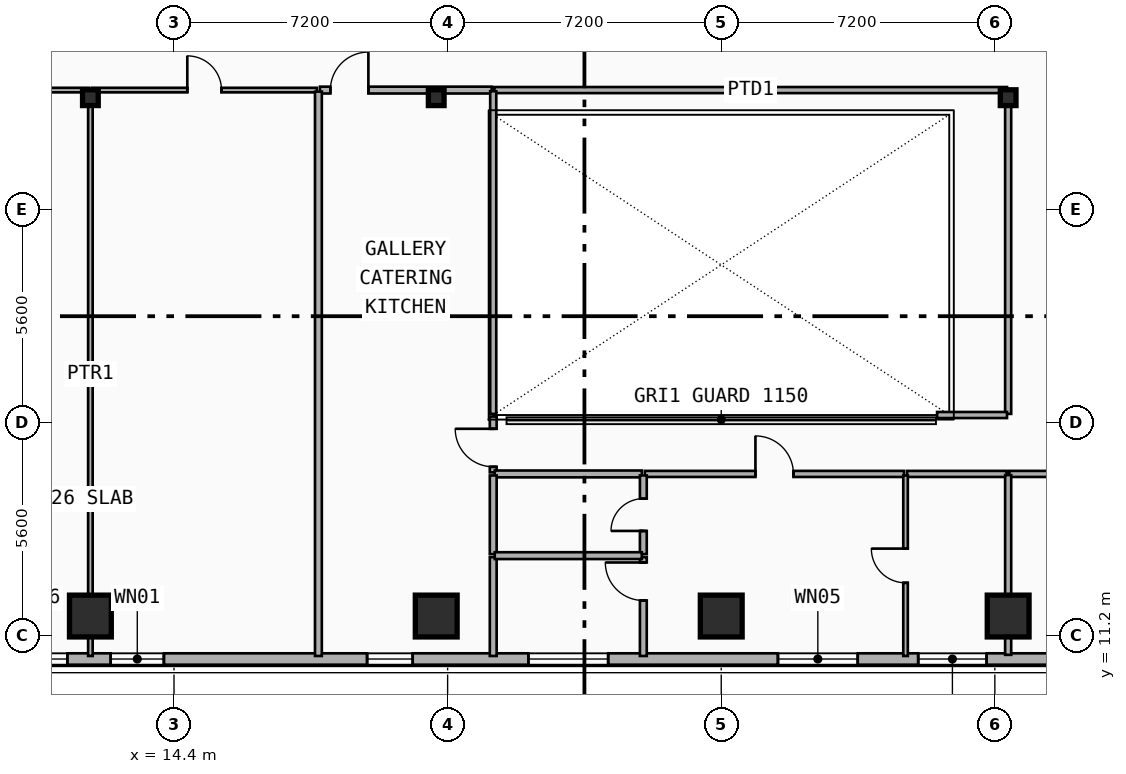
"""IFC4 building model, lengths in metres.
Left out: names, types, materials, properties, quantities, classifications, styles, units other than length and angle.
Written with IfcOpenShell. Run it as: python <this file> out.ifc"""

import sys

from ifc_helpers import new_model, si_unit, direction, frame, frame_2d, origin, origin_2d, place, context, subcontext, project, spatial, rectangle, i_section, extrude, element, fill, save


model = new_model("IFC4")
c1 = context("Model", 3, precision=1e-05, world=origin(), true_north=direction((0.0, 1.0)))
c2 = subcontext(c1, "Body", "Model", "MODEL_VIEW")
j1 = project(units=[si_unit("LENGTHUNIT", "METRE"), si_unit("PLANEANGLEUNIT", "RADIAN")], contexts=[c1])
p1 = place(None, origin())
s1 = spatial("IfcSite", under=j1, at=p1, CompositionType="ELEMENT")
p2 = place(p1, origin())
s2 = spatial("IfcBuilding", under=s1, at=p2, CompositionType="ELEMENT")
p3 = place(p2, frame((0.0, 0.0, 159.0)))
s3 = spatial("IfcBuildingStorey", under=s2, at=p3, CompositionType="ELEMENT", Elevation=159.0)
for number, where, z_axis, x_axis in (
    (1, (12.2, 25.35, 0.0), (0.0, 0.0, 1.0), (1.0, 0.0, 0.0)),
    (2, (21.3, 25.35, 0.0), (0.0, 0.0, 1.0), (1.0, 0.0, 0.0)),
    (3, (36.35, 25.35, 0.0), (0.0, 0.0, 1.0), (1.0, 0.0, 0.0)),
):
    element("IfcColumn", number, at=place(p3, frame(where, z_axis=z_axis, x_axis=x_axis)), inside=s3, PredefinedType="COLUMN", context=c2, shape_type="SweptSolid", body=[
        extrude(i_section(OverallWidth=0.413, OverallDepth=0.415, WebThickness=0.03, FlangeThickness=0.047, FilletRadius=0.015, at=origin_2d()), origin(), (0.0, 0.0, 1.0), 3.55),
    ])
for number, where, z_axis, x_axis in (
    (4, (12.2, 11.819, 0.0), (0.0, -0.09, 0.996), (1.0, 0.0, 0.0)),
    (5, (21.3, 11.819, 0.0), (0.0, -0.09, 0.996), (1.0, 0.0, 0.0)),
    (6, (28.8, 11.819, 0.0), (0.0, -0.09, 0.996), (1.0, 0.0, 0.0)),
    (7, (36.35, 11.819, 0.0), (0.0, -0.09, 0.996), (1.0, 0.0, 0.0)),
):
    element("IfcColumn", number, at=place(p3, frame(where, z_axis=z_axis, x_axis=x_axis)), inside=s3, PredefinedType="COLUMN", context=c2, shape_type="SweptSolid", body=[
        extrude(rectangle(XDim=1.1, YDim=1.1, at=origin_2d()), origin(), (0.0, 0.0, 1.0), 3.565),
    ])
p4 = place(p3, frame((48.0, 10.58, 0.0), z_axis=(0.0, 0.0, 1.0), x_axis=(-1.0, 0.0, 0.0)))
e8 = element("IfcWall", 8, at=p4, inside=s3, PredefinedType="SOLIDWALL", context=c2, shape_type="SweptSolid", body=[
    extrude(rectangle(XDim=38.4, YDim=0.3, at=frame_2d((19.2, 0.0))), origin(), (0.0, 0.0, 1.0), 3.29),
])
p5 = place(p4, frame((36.407, 0.0, 0.75)))
e9 = element("IfcOpeningElement", 9, at=p5, cuts=e8, PredefinedType="OPENING", context=c2, shape_type="SweptSolid", body=[
    extrude(rectangle(XDim=1.6, YDim=1.95, at=frame_2d((0.8, 0.975))), frame((0.0, 0.16, 0.0), z_axis=(0.0, -1.0, 0.0), x_axis=(1.0, 0.0, 0.0)), (0.0, 0.0, 1.0), 0.32),
])
p6 = place(p4, frame((33.866, 0.0, 0.34)))
e10 = element("IfcOpeningElement", 10, at=p6, cuts=e8, PredefinedType="OPENING", context=c2, shape_type="SweptSolid", body=[
    extrude(rectangle(XDim=1.4, YDim=1.8, at=frame_2d((0.7, 0.9))), frame((0.0, 0.16, 0.0), z_axis=(0.0, -1.0, 0.0), x_axis=(1.0, 0.0, 0.0)), (0.0, 0.0, 1.0), 0.32),
])
p7 = place(p4, frame((27.319, 0.0, 1.05)))
e11 = element("IfcOpeningElement", 11, at=p7, cuts=e8, PredefinedType="OPENING", context=c2, shape_type="SweptSolid", body=[
    extrude(rectangle(XDim=1.2, YDim=1.5, at=frame_2d((0.6, 0.75))), frame((0.0, 0.16, 0.0), z_axis=(0.0, -1.0, 0.0), x_axis=(1.0, 0.0, 0.0)), (0.0, 0.0, 1.0), 0.32),
])
p8 = place(p4, frame((15.608, 0.0, 0.65)))
e12 = element("IfcOpeningElement", 12, at=p8, cuts=e8, PredefinedType="OPENING", context=c2, shape_type="SweptSolid", body=[
    extrude(rectangle(XDim=2.1, YDim=2.1, at=frame_2d((1.05, 1.05))), frame((0.0, 0.16, 0.0), z_axis=(0.0, -1.0, 0.0), x_axis=(1.0, 0.0, 0.0)), (0.0, 0.0, 1.0), 0.32),
])
p9 = place(p4, frame((22.175, 0.0, 0.65)))
e13 = element("IfcOpeningElement", 13, at=p9, cuts=e8, PredefinedType="OPENING", context=c2, shape_type="SweptSolid", body=[
    extrude(rectangle(XDim=2.1, YDim=2.1, at=frame_2d((1.05, 1.05))), frame((0.0, 0.16, 0.0), z_axis=(0.0, -1.0, 0.0), x_axis=(1.0, 0.0, 0.0)), (0.0, 0.0, 1.0), 0.32),
])
p10 = place(p4, frame((12.217, 0.0, 0.34)))
e14 = element("IfcOpeningElement", 14, at=p10, cuts=e8, PredefinedType="OPENING", context=c2, shape_type="SweptSolid", body=[
    extrude(rectangle(XDim=1.8, YDim=1.8, at=frame_2d((0.9, 0.9))), frame((0.0, 0.16, 0.0), z_axis=(0.0, -1.0, 0.0), x_axis=(1.0, 0.0, 0.0)), (0.0, 0.0, 1.0), 0.32),
])
p11 = place(p4, frame((3.319, 0.0, 1.05)))
e15 = element("IfcOpeningElement", 15, at=p11, cuts=e8, PredefinedType="OPENING", context=c2, shape_type="SweptSolid", body=[
    extrude(rectangle(XDim=1.2, YDim=1.5, at=frame_2d((0.6, 0.75))), frame((0.0, 0.16, 0.0), z_axis=(0.0, -1.0, 0.0), x_axis=(1.0, 0.0, 0.0)), (0.0, 0.0, 1.0), 0.32),
])
p12 = place(p4, frame((8.25, 0.0, 0.52)))
e16 = element("IfcOpeningElement", 16, at=p12, cuts=e8, PredefinedType="OPENING", context=c2, shape_type="SweptSolid", body=[
    extrude(rectangle(XDim=1.1, YDim=1.05, at=frame_2d((0.55, 0.525))), frame((0.0, 0.16, 0.0), z_axis=(0.0, -1.0, 0.0), x_axis=(1.0, 0.0, 0.0)), (0.0, 0.0, 1.0), 0.32),
])
p13 = place(p4, frame((0.4, 0.0, 0.68)))
e17 = element("IfcOpeningElement", 17, at=p13, cuts=e8, PredefinedType="OPENING", context=c2, shape_type="SweptSolid", body=[
    extrude(rectangle(XDim=1.2, YDim=1.5, at=frame_2d((0.6, 0.75))), frame((0.0, 0.16, 0.0), z_axis=(0.0, -1.0, 0.0), x_axis=(1.0, 0.0, 0.0)), (0.0, 0.0, 1.0), 0.32),
])
p14 = place(p3, frame((5.66, 25.55, 0.0), z_axis=(0.0, 0.0, 1.0), x_axis=(1.0, 0.0, 0.0)))
e18 = element("IfcWall", 18, at=p14, inside=s3, PredefinedType="PARTITIONING", context=c2, shape_type="SweptSolid", body=[
    extrude(rectangle(XDim=6.5, YDim=0.12, at=frame_2d((3.25, 0.0))), origin(), (0.0, 0.0, 1.0), 2.36),
])
p15 = place(p14, frame((2.8, 0.0, 0.0)))
e19 = element("IfcOpeningElement", 19, at=p15, cuts=e18, PredefinedType="OPENING", context=c2, shape_type="SweptSolid", body=[
    extrude(rectangle(XDim=0.9, YDim=2.1, at=frame_2d((0.45, 1.05))), frame((0.0, 0.07, 0.0), z_axis=(0.0, -1.0, 0.0), x_axis=(1.0, 0.0, 0.0)), (0.0, 0.0, 1.0), 0.14),
])
p16 = place(p3, frame((12.24, 25.55, 0.0), z_axis=(0.0, 0.0, 1.0), x_axis=(1.0, 0.0, 0.0)))
e20 = element("IfcWall", 20, at=p16, inside=s3, PredefinedType="PARTITIONING", context=c2, shape_type="SweptSolid", body=[
    extrude(rectangle(XDim=5.92, YDim=0.12, at=frame_2d((2.96, 0.0))), origin(), (0.0, 0.0, 1.0), 2.36),
])
p17 = place(p16, frame((2.51, 0.0, 0.0)))
e21 = element("IfcOpeningElement", 21, at=p17, cuts=e20, PredefinedType="OPENING", context=c2, shape_type="SweptSolid", body=[
    extrude(rectangle(XDim=0.9, YDim=2.1, at=frame_2d((0.45, 1.05))), frame((0.0, 0.07, 0.0), z_axis=(0.0, -1.0, 0.0), x_axis=(1.0, 0.0, 0.0)), (0.0, 0.0, 1.0), 0.14),
])
p18 = place(p3, frame((18.24, 25.55, 0.0), z_axis=(0.0, 0.0, 1.0), x_axis=(1.0, 0.0, 0.0)))
e22 = element("IfcWall", 22, at=p18, inside=s3, PredefinedType="PLUMBINGWALL", context=c2, shape_type="SweptSolid", body=[
    extrude(rectangle(XDim=4.52, YDim=0.18, at=frame_2d((2.26, 0.0))), origin(), (0.0, 0.0, 1.0), 2.36),
])
p19 = place(p18, frame((0.275, 0.0, 0.0)))
e23 = element("IfcOpeningElement", 23, at=p19, cuts=e22, PredefinedType="OPENING", context=c2, shape_type="SweptSolid", body=[
    extrude(rectangle(XDim=1.0, YDim=2.15, at=frame_2d((0.5, 1.075))), frame((0.0, 0.1, 0.0), z_axis=(0.0, -1.0, 0.0), x_axis=(1.0, 0.0, 0.0)), (0.0, 0.0, 1.0), 0.2),
])
p20 = place(p3, frame((22.8, 15.49, 0.0), z_axis=(0.0, 0.0, 1.0), x_axis=(0.0, 1.0, 0.0)))
e24 = element("IfcWall", 24, at=p20, inside=s3, PredefinedType="PLUMBINGWALL", context=c2, shape_type="SweptSolid", body=[
    extrude(rectangle(XDim=1.47, YDim=0.18, at=frame_2d((0.735, 0.0))), origin(), (0.0, 0.0, 1.0), 2.73),
])
p21 = place(p20, frame((0.148, 0.0, 0.0)))
e25 = element("IfcOpeningElement", 25, at=p21, cuts=e24, PredefinedType="OPENING", context=c2, shape_type="SweptSolid", body=[
    extrude(rectangle(XDim=1.0, YDim=2.15, at=frame_2d((0.5, 1.075))), frame((0.0, 0.1, 0.0), z_axis=(0.0, -1.0, 0.0), x_axis=(1.0, 0.0, 0.0)), (0.0, 0.0, 1.0), 0.2),
])
p22 = place(p3, frame((26.79, 15.45, 0.0), z_axis=(0.0, 0.0, 1.0), x_axis=(1.0, 0.0, 0.0)))
e26 = element("IfcWall", 26, at=p22, inside=s3, PredefinedType="PARTITIONING", context=c2, shape_type="SweptSolid", body=[
    extrude(rectangle(XDim=6.82, YDim=0.16, at=frame_2d((3.41, 0.0))), origin(), (0.0, 0.0, 1.0), 2.36),
])
p23 = place(p22, frame((2.91, 0.0, 0.0)))
e27 = element("IfcOpeningElement", 27, at=p23, cuts=e26, PredefinedType="OPENING", context=c2, shape_type="SweptSolid", body=[
    extrude(rectangle(XDim=1.0, YDim=2.15, at=frame_2d((0.5, 1.075))), frame((0.0, 0.09, 0.0), z_axis=(0.0, -1.0, 0.0), x_axis=(1.0, 0.0, 0.0)), (0.0, 0.0, 1.0), 0.18),
])
p24 = place(p3, frame((22.84, 15.45, 0.0), z_axis=(0.0, 0.0, 1.0), x_axis=(1.0, 0.0, 0.0)))
e28 = element("IfcWall", 28, at=p24, inside=s3, PredefinedType="PLUMBINGWALL", context=c2, shape_type="SweptSolid", body=[
    extrude(rectangle(XDim=3.87, YDim=0.18, at=frame_2d((1.935, 0.0))), origin(), (0.0, 0.0, 1.0), 2.97),
])
p25 = place(p3, frame((33.69, 15.45, 0.0), z_axis=(0.0, 0.0, 1.0), x_axis=(1.0, 0.0, 0.0)))
e29 = element("IfcWall", 29, at=p25, inside=s3, PredefinedType="PARTITIONING", context=c2, shape_type="SweptSolid", body=[
    extrude(rectangle(XDim=2.62, YDim=0.16, at=frame_2d((1.31, 0.0))), origin(), (0.0, 0.0, 1.0), 2.36),
])
p26 = place(p3, frame((12.2, 10.66, 0.0), z_axis=(0.0, 0.0, 1.0), x_axis=(0.0, 1.0, 0.0)))
e30 = element("IfcWall", 30, at=p26, inside=s3, PredefinedType="PARTITIONING", context=c2, shape_type="SweptSolid", body=[
    extrude(rectangle(XDim=14.85, YDim=0.12, at=frame_2d((7.425, 0.0))), origin(), (0.0, 0.0, 1.0), 2.36),
])
p27 = place(p3, frame((18.2, 10.66, 0.0), z_axis=(0.0, 0.0, 1.0), x_axis=(0.0, 1.0, 0.0)))
e31 = element("IfcWall", 31, at=p27, inside=s3, PredefinedType="PLUMBINGWALL", context=c2, shape_type="SweptSolid", body=[
    extrude(rectangle(XDim=14.85, YDim=0.18, at=frame_2d((7.425, 0.0))), origin(), (0.0, 0.0, 1.0), 2.82),
])
p28 = place(p3, frame((22.8, 10.66, 0.0), z_axis=(0.0, 0.0, 1.0), x_axis=(0.0, 1.0, 0.0)))
e32 = element("IfcWall", 32, at=p28, inside=s3, PredefinedType="PLUMBINGWALL", context=c2, shape_type="SweptSolid", body=[
    extrude(rectangle(XDim=2.6, YDim=0.18, at=frame_2d((1.3, 0.0))), origin(), (0.0, 0.0, 1.0), 2.91),
])
p29 = place(p3, frame((22.8, 13.34, 0.0), z_axis=(0.0, 0.0, 1.0), x_axis=(0.0, 1.0, 0.0)))
e33 = element("IfcWall", 33, at=p29, inside=s3, PredefinedType="PLUMBINGWALL", context=c2, shape_type="SweptSolid", body=[
    extrude(rectangle(XDim=2.07, YDim=0.18, at=frame_2d((1.035, 0.0))), origin(), (0.0, 0.0, 1.0), 2.97),
])
p30 = place(p3, frame((26.75, 10.66, 0.0), z_axis=(0.0, 0.0, 1.0), x_axis=(0.0, 1.0, 0.0)))
e34 = element("IfcWall", 34, at=p30, inside=s3, PredefinedType="PLUMBINGWALL", context=c2, shape_type="SweptSolid", body=[
    extrude(rectangle(XDim=2.6, YDim=0.18, at=frame_2d((1.3, 0.0))), origin(), (0.0, 0.0, 1.0), 2.91),
])
p31 = place(p30, frame((1.46, 0.0, 0.0)))
e35 = element("IfcOpeningElement", 35, at=p31, cuts=e34, PredefinedType="OPENING", context=c2, shape_type="SweptSolid", body=[
    extrude(rectangle(XDim=1.0, YDim=2.15, at=frame_2d((0.5, 1.075))), frame((0.0, 0.1, 0.0), z_axis=(0.0, -1.0, 0.0), x_axis=(1.0, 0.0, 0.0)), (0.0, 0.0, 1.0), 0.2),
])
p32 = place(p3, frame((26.75, 13.34, 0.0), z_axis=(0.0, 0.0, 1.0), x_axis=(0.0, 1.0, 0.0)))
e36 = element("IfcWall", 36, at=p32, inside=s3, PredefinedType="PLUMBINGWALL", context=c2, shape_type="SweptSolid", body=[
    extrude(rectangle(XDim=2.07, YDim=0.18, at=frame_2d((1.035, 0.0))), origin(), (0.0, 0.0, 1.0), 2.97),
])
p33 = place(p32, frame((0.61, 0.0, 0.0)))
e37 = element("IfcOpeningElement", 37, at=p33, cuts=e36, PredefinedType="OPENING", context=c2, shape_type="SweptSolid", body=[
    extrude(rectangle(XDim=0.85, YDim=2.1, at=frame_2d((0.425, 1.05))), frame((0.0, 0.1, 0.0), z_axis=(0.0, -1.0, 0.0), x_axis=(1.0, 0.0, 0.0)), (0.0, 0.0, 1.0), 0.2),
])
p34 = place(p3, frame((33.65, 10.66, 0.0), z_axis=(0.0, 0.0, 1.0), x_axis=(0.0, 1.0, 0.0)))
e38 = element("IfcWall", 38, at=p34, inside=s3, PredefinedType="PARTITIONING", context=c2, shape_type="SweptSolid", body=[
    extrude(rectangle(XDim=4.75, YDim=0.12, at=frame_2d((2.375, 0.0))), origin(), (0.0, 0.0, 1.0), 2.91),
])
p35 = place(p34, frame((1.925, 0.0, 0.0)))
e39 = element("IfcOpeningElement", 39, at=p35, cuts=e38, PredefinedType="OPENING", context=c2, shape_type="SweptSolid", body=[
    extrude(rectangle(XDim=0.9, YDim=2.1, at=frame_2d((0.45, 1.05))), frame((0.0, 0.07, 0.0), z_axis=(0.0, -1.0, 0.0), x_axis=(1.0, 0.0, 0.0)), (0.0, 0.0, 1.0), 0.14),
])
p36 = place(p3, frame((22.84, 13.3, 0.0), z_axis=(0.0, 0.0, 1.0), x_axis=(1.0, 0.0, 0.0)))
e40 = element("IfcWall", 40, at=p36, inside=s3, PredefinedType="PLUMBINGWALL", context=c2, shape_type="SweptSolid", body=[
    extrude(rectangle(XDim=3.87, YDim=0.18, at=frame_2d((1.935, 0.0))), origin(), (0.0, 0.0, 1.0), 3.29),
])
p37 = place(p3, frame((22.83, 25.55, 0.0), z_axis=(0.0, 0.0, 1.0), x_axis=(1.0, 0.0, 0.0)))
e41 = element("IfcWall", 41, at=p37, inside=s3, PredefinedType="PARTITIONING", context=c2, shape_type="SweptSolid", body=[
    extrude(rectangle(XDim=13.49, YDim=0.16, at=frame_2d((6.745, 0.0))), origin(), (0.0, 0.0, 1.0), 2.36),
])
p38 = place(p3, frame((36.38, 15.45, 0.0), z_axis=(0.0, 0.0, 1.0), x_axis=(1.0, 0.0, 0.0)))
e42 = element("IfcWall", 42, at=p38, inside=s3, PredefinedType="PARTITIONING", context=c2, shape_type="SweptSolid", body=[
    extrude(rectangle(XDim=1.94, YDim=0.16, at=frame_2d((0.97, 0.0))), origin(), (0.0, 0.0, 1.0), 2.36),
])
p39 = place(p3, frame((36.35, 17.03, 0.0), z_axis=(0.0, 0.0, 1.0), x_axis=(0.0, 1.0, 0.0)))
e43 = element("IfcWall", 43, at=p39, inside=s3, PredefinedType="PARTITIONING", context=c2, shape_type="SweptSolid", body=[
    extrude(rectangle(XDim=8.49, YDim=0.16, at=frame_2d((4.245, 0.0))), origin(), (0.0, 0.0, 1.0), 2.36),
])
p40 = place(p3, frame((34.48, 17.0, 0.0), z_axis=(0.0, 0.0, 1.0), x_axis=(1.0, 0.0, 0.0)))
e44 = element("IfcWall", 44, at=p40, inside=s3, PredefinedType="PARTITIONING", context=c2, shape_type="SweptSolid", body=[
    extrude(rectangle(XDim=1.84, YDim=0.16, at=frame_2d((0.92, 0.0))), origin(), (0.0, 0.0, 1.0), 2.36),
])
p41 = place(p3, frame((22.8, 17.03, 0.0), z_axis=(0.0, 0.0, 1.0), x_axis=(0.0, 1.0, 0.0)))
e45 = element("IfcWall", 45, at=p41, inside=s3, PredefinedType="PARTITIONING", context=c2, shape_type="SweptSolid", body=[
    extrude(rectangle(XDim=8.49, YDim=0.16, at=frame_2d((4.245, 0.0))), origin(), (0.0, 0.0, 1.0), 2.73),
])
p42 = place(p3, frame((36.35, 10.69, 0.0), z_axis=(0.0, 0.0, 1.0), x_axis=(0.0, 1.0, 0.0)))
e46 = element("IfcWall", 46, at=p42, inside=s3, PredefinedType="PARTITIONING", context=c2, shape_type="SweptSolid", body=[
    extrude(rectangle(XDim=4.73, YDim=0.16, at=frame_2d((2.365, 0.0))), origin(), (0.0, 0.0, 1.0), 2.36),
])
p43 = place(p5, origin())
e47 = element("IfcWindow", 47, at=p43, inside=s3, PartitioningType="SINGLE_PANEL", PredefinedType="WINDOW", context=c2, shape_type="SweptSolid", body=[
    extrude(rectangle(XDim=1.6, YDim=1.95, at=frame_2d((0.8, 0.975))), frame((0.0, 0.03, 0.0), z_axis=(0.0, -1.0, 0.0), x_axis=(1.0, 0.0, 0.0)), (0.0, 0.0, 1.0), 0.06),
])
fill(e9, e47)
p44 = place(p6, origin())
e48 = element("IfcWindow", 48, at=p44, inside=s3, PartitioningType="SINGLE_PANEL", PredefinedType="WINDOW", context=c2, shape_type="SweptSolid", body=[
    extrude(rectangle(XDim=1.4, YDim=1.8, at=frame_2d((0.7, 0.9))), frame((0.0, 0.03, 0.0), z_axis=(0.0, -1.0, 0.0), x_axis=(1.0, 0.0, 0.0)), (0.0, 0.0, 1.0), 0.06),
])
fill(e10, e48)
p45 = place(p7, origin())
e49 = element("IfcWindow", 49, at=p45, inside=s3, PartitioningType="SINGLE_PANEL", PredefinedType="WINDOW", context=c2, shape_type="SweptSolid", body=[
    extrude(rectangle(XDim=1.2, YDim=1.5, at=frame_2d((0.6, 0.75))), frame((0.0, 0.03, 0.0), z_axis=(0.0, -1.0, 0.0), x_axis=(1.0, 0.0, 0.0)), (0.0, 0.0, 1.0), 0.06),
])
fill(e11, e49)
p46 = place(p8, origin())
e50 = element("IfcWindow", 50, at=p46, inside=s3, PartitioningType="SINGLE_PANEL", PredefinedType="WINDOW", context=c2, shape_type="SweptSolid", body=[
    extrude(rectangle(XDim=2.1, YDim=2.1, at=frame_2d((1.05, 1.05))), frame((0.0, 0.03, 0.0), z_axis=(0.0, -1.0, 0.0), x_axis=(1.0, 0.0, 0.0)), (0.0, 0.0, 1.0), 0.06),
])
fill(e12, e50)
p47 = place(p9, origin())
e51 = element("IfcWindow", 51, at=p47, inside=s3, PartitioningType="SINGLE_PANEL", PredefinedType="WINDOW", context=c2, shape_type="SweptSolid", body=[
    extrude(rectangle(XDim=2.1, YDim=2.1, at=frame_2d((1.05, 1.05))), frame((0.0, 0.03, 0.0), z_axis=(0.0, -1.0, 0.0), x_axis=(1.0, 0.0, 0.0)), (0.0, 0.0, 1.0), 0.06),
])
fill(e13, e51)
p48 = place(p10, origin())
e52 = element("IfcWindow", 52, at=p48, inside=s3, PartitioningType="SINGLE_PANEL", PredefinedType="WINDOW", context=c2, shape_type="SweptSolid", body=[
    extrude(rectangle(XDim=1.8, YDim=1.8, at=frame_2d((0.9, 0.9))), frame((0.0, 0.03, 0.0), z_axis=(0.0, -1.0, 0.0), x_axis=(1.0, 0.0, 0.0)), (0.0, 0.0, 1.0), 0.06),
])
fill(e14, e52)
p49 = place(p17, origin())
e53 = element("IfcDoor", 53, at=p49, inside=s3, OperationType="SINGLE_SWING_LEFT", PredefinedType="DOOR", context=c2, shape_type="SweptSolid", body=[
    extrude(rectangle(XDim=0.9, YDim=2.1, at=frame_2d((0.45, 1.05))), frame((0.0, 0.025, 0.0), z_axis=(0.0, -1.0, 0.0), x_axis=(1.0, 0.0, 0.0)), (0.0, 0.0, 1.0), 0.05),
])
fill(e21, e53)
p50 = place(p19, origin())
e54 = element("IfcDoor", 54, at=p50, inside=s3, OperationType="SINGLE_SWING_RIGHT", PredefinedType="DOOR", context=c2, shape_type="SweptSolid", body=[
    extrude(rectangle(XDim=1.0, YDim=2.15, at=frame_2d((0.5, 1.075))), frame((0.0, 0.025, 0.0), z_axis=(0.0, -1.0, 0.0), x_axis=(1.0, 0.0, 0.0)), (0.0, 0.0, 1.0), 0.05),
])
fill(e23, e54)
p51 = place(p21, origin())
e55 = element("IfcDoor", 55, at=p51, inside=s3, OperationType="SINGLE_SWING_RIGHT", PredefinedType="DOOR", context=c2, shape_type="SweptSolid", body=[
    extrude(rectangle(XDim=1.0, YDim=2.15, at=frame_2d((0.5, 1.075))), frame((0.0, 0.025, 0.0), z_axis=(0.0, -1.0, 0.0), x_axis=(1.0, 0.0, 0.0)), (0.0, 0.0, 1.0), 0.05),
])
fill(e25, e55)
p52 = place(p23, origin())
e56 = element("IfcDoor", 56, at=p52, inside=s3, OperationType="SINGLE_SWING_LEFT", PredefinedType="DOOR", context=c2, shape_type="SweptSolid", body=[
    extrude(rectangle(XDim=1.0, YDim=2.15, at=frame_2d((0.5, 1.075))), frame((0.0, 0.025, 0.0), z_axis=(0.0, -1.0, 0.0), x_axis=(1.0, 0.0, 0.0)), (0.0, 0.0, 1.0), 0.05),
])
fill(e27, e56)
p53 = place(p31, origin())
e57 = element("IfcDoor", 57, at=p53, inside=s3, OperationType="SINGLE_SWING_RIGHT", PredefinedType="DOOR", context=c2, shape_type="SweptSolid", body=[
    extrude(rectangle(XDim=1.0, YDim=2.15, at=frame_2d((0.5, 1.075))), frame((0.0, 0.025, 0.0), z_axis=(0.0, -1.0, 0.0), x_axis=(1.0, 0.0, 0.0)), (0.0, 0.0, 1.0), 0.05),
])
fill(e35, e57)
p54 = place(p33, origin())
e58 = element("IfcDoor", 58, at=p54, inside=s3, OperationType="SINGLE_SWING_LEFT", PredefinedType="DOOR", context=c2, shape_type="SweptSolid", body=[
    extrude(rectangle(XDim=0.85, YDim=2.1, at=frame_2d((0.425, 1.05))), frame((0.0, 0.025, 0.0), z_axis=(0.0, -1.0, 0.0), x_axis=(1.0, 0.0, 0.0)), (0.0, 0.0, 1.0), 0.05),
])
fill(e37, e58)
p55 = place(p35, origin())
e59 = element("IfcDoor", 59, at=p55, inside=s3, OperationType="SINGLE_SWING_RIGHT", PredefinedType="DOOR", context=c2, shape_type="SweptSolid", body=[
    extrude(rectangle(XDim=0.9, YDim=2.1, at=frame_2d((0.45, 1.05))), frame((0.0, 0.025, 0.0), z_axis=(0.0, -1.0, 0.0), x_axis=(1.0, 0.0, 0.0)), (0.0, 0.0, 1.0), 0.05),
])
fill(e39, e59)
save(model, sys.argv[1])
